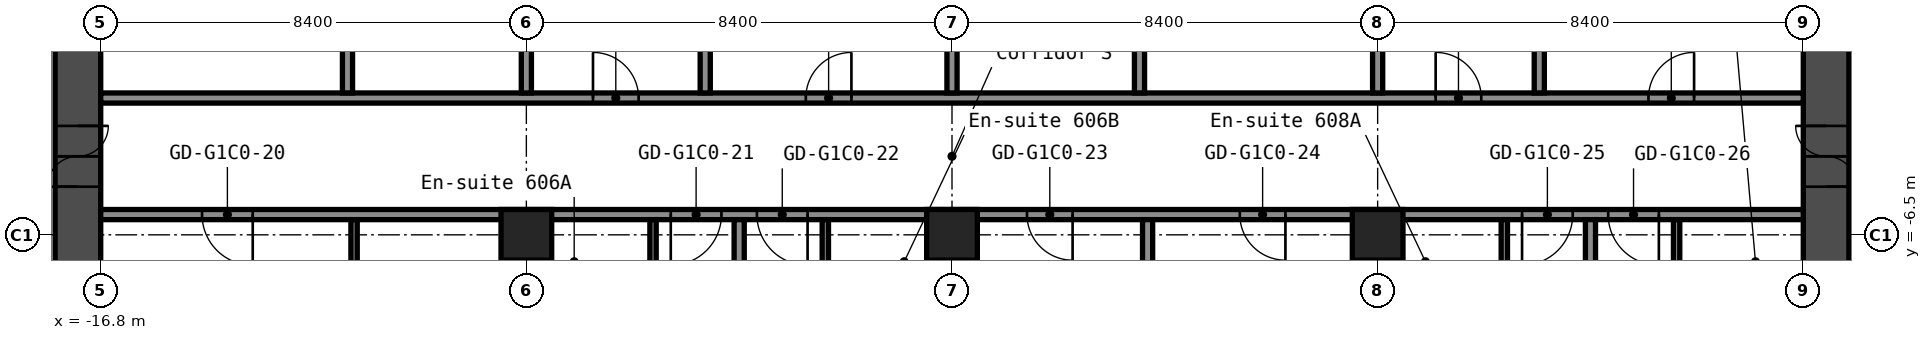
"""IFC4 building model, lengths in metres.
Left out: names, types, materials, properties, quantities, classifications, styles, units other than length and angle.
Written with IfcOpenShell. Run it as: python <this file> out.ifc"""

import sys

from ifc_helpers import new_model, si_unit, direction, frame, frame_2d, origin, origin_2d, place, context, subcontext, project, spatial, rectangle, hollow_rectangle, extrude, element, fill, save


model = new_model("IFC4")
c1 = context("Model", 3, precision=1e-05, world=origin(), true_north=direction((0.0, 1.0)))
c2 = subcontext(c1, "Body", "Model", "MODEL_VIEW")
j1 = project(units=[si_unit("LENGTHUNIT", "METRE"), si_unit("PLANEANGLEUNIT", "RADIAN")], contexts=[c1])
p1 = place(None, origin())
s1 = spatial("IfcSite", under=j1, at=p1, CompositionType="ELEMENT")
p2 = place(p1, origin())
s2 = spatial("IfcBuilding", under=s1, at=p2, CompositionType="ELEMENT")
p3 = place(p2, frame((0.0, 0.0, 26.2)))
s3 = spatial("IfcBuildingStorey", under=s2, at=p3, CompositionType="ELEMENT", Elevation=26.2)
for number, where, z_axis, x_axis in (
    (1, (-8.4, -6.5, 0.0), (0.0, 0.0, 1.0), (1.0, 0.0, 0.0)),
    (2, (0.0, -6.5, 0.0), (0.0, 0.0, 1.0), (1.0, 0.0, 0.0)),
    (3, (8.4, -6.5, 0.0), (0.0, 0.0, 1.0), (1.0, 0.0, 0.0)),
):
    element("IfcColumn", number, at=place(p3, frame(where, z_axis=z_axis, x_axis=x_axis)), inside=s3, PredefinedType="COLUMN", context=c2, shape_type="SweptSolid", body=[
        extrude(hollow_rectangle(XDim=1.0, YDim=1.0, WallThickness=0.04, at=origin_2d()), origin(), (0.0, 0.0, 1.0), 2.8),
    ])
p4 = place(p3, frame((-17.25, -8.4, 0.0), z_axis=(0.0, 0.0, 1.0), x_axis=(0.0, 1.0, 0.0)))
e4 = element("IfcWall", 4, at=p4, inside=s3, PredefinedType="SHEAR", context=c2, shape_type="SweptSolid", body=[
    extrude(rectangle(XDim=16.8, YDim=0.9, at=frame_2d((8.4, 0.0))), origin(), (0.0, 0.0, 1.0), 2.8),
])
p5 = place(p4, frame((12.75, 0.0, 0.0)))
e5 = element("IfcOpeningElement", 5, at=p5, cuts=e4, PredefinedType="OPENING", context=c2, shape_type="SweptSolid", body=[
    extrude(rectangle(XDim=1.2, YDim=2.1, at=frame_2d((0.6, 1.05))), frame((0.0, 0.46, 0.0), z_axis=(0.0, -1.0, 0.0), x_axis=(1.0, 0.0, 0.0)), (0.0, 0.0, 1.0), 0.92),
])
p6 = place(p4, frame((2.85, 0.0, 0.0)))
e6 = element("IfcOpeningElement", 6, at=p6, cuts=e4, PredefinedType="OPENING", context=c2, shape_type="SweptSolid", body=[
    extrude(rectangle(XDim=1.2, YDim=2.1, at=frame_2d((0.6, 1.05))), frame((0.0, 0.46, 0.0), z_axis=(0.0, -1.0, 0.0), x_axis=(1.0, 0.0, 0.0)), (0.0, 0.0, 1.0), 0.92),
])
p7 = place(p3, frame((17.25, -8.4, 0.0), z_axis=(0.0, 0.0, 1.0), x_axis=(0.0, 1.0, 0.0)))
e7 = element("IfcWall", 7, at=p7, inside=s3, PredefinedType="SHEAR", context=c2, shape_type="SweptSolid", body=[
    extrude(rectangle(XDim=16.8, YDim=0.9, at=frame_2d((8.4, 0.0))), origin(), (0.0, 0.0, 1.0), 2.8),
])
p8 = place(p7, frame((12.75, 0.0, 0.0)))
e8 = element("IfcOpeningElement", 8, at=p8, cuts=e7, PredefinedType="OPENING", context=c2, shape_type="SweptSolid", body=[
    extrude(rectangle(XDim=1.2, YDim=2.1, at=frame_2d((0.6, 1.05))), frame((0.0, 0.46, 0.0), z_axis=(0.0, -1.0, 0.0), x_axis=(1.0, 0.0, 0.0)), (0.0, 0.0, 1.0), 0.92),
])
p9 = place(p7, frame((2.85, 0.0, 0.0)))
e9 = element("IfcOpeningElement", 9, at=p9, cuts=e7, PredefinedType="OPENING", context=c2, shape_type="SweptSolid", body=[
    extrude(rectangle(XDim=1.2, YDim=2.1, at=frame_2d((0.6, 1.05))), frame((0.0, 0.46, 0.0), z_axis=(0.0, -1.0, 0.0), x_axis=(1.0, 0.0, 0.0)), (0.0, 0.0, 1.0), 0.92),
])
p10 = place(p3, frame((-16.8, -6.1, 0.0), z_axis=(0.0, 0.0, 1.0), x_axis=(1.0, 0.0, 0.0)))
e10 = element("IfcWall", 10, at=p10, inside=s3, PredefinedType="PARTITIONING", context=c2, shape_type="SweptSolid", body=[
    extrude(rectangle(XDim=33.6, YDim=0.2, at=frame_2d((16.8, 0.0))), origin(), (0.0, 0.0, 1.0), 2.8),
])
p11 = place(p10, frame((2.0, 0.0, 0.0)))
e11 = element("IfcOpeningElement", 11, at=p11, cuts=e10, PredefinedType="OPENING", context=c2, shape_type="SweptSolid", body=[
    extrude(rectangle(XDim=1.0, YDim=2.1, at=frame_2d((0.5, 1.05))), frame((0.0, 0.11, 0.0), z_axis=(0.0, -1.0, 0.0), x_axis=(1.0, 0.0, 0.0)), (0.0, 0.0, 1.0), 0.22),
])
p12 = place(p10, frame((11.25, 0.0, 0.0)))
e12 = element("IfcOpeningElement", 12, at=p12, cuts=e10, PredefinedType="OPENING", context=c2, shape_type="SweptSolid", body=[
    extrude(rectangle(XDim=1.0, YDim=2.1, at=frame_2d((0.5, 1.05))), frame((0.0, 0.11, 0.0), z_axis=(0.0, -1.0, 0.0), x_axis=(1.0, 0.0, 0.0)), (0.0, 0.0, 1.0), 0.22),
])
p13 = place(p10, frame((12.95, 0.0, 0.0)))
e13 = element("IfcOpeningElement", 13, at=p13, cuts=e10, PredefinedType="OPENING", context=c2, shape_type="SweptSolid", body=[
    extrude(rectangle(XDim=1.0, YDim=2.1, at=frame_2d((0.5, 1.05))), frame((0.0, 0.11, 0.0), z_axis=(0.0, -1.0, 0.0), x_axis=(1.0, 0.0, 0.0)), (0.0, 0.0, 1.0), 0.22),
])
p14 = place(p10, frame((18.28, 0.0, 0.0)))
e14 = element("IfcOpeningElement", 14, at=p14, cuts=e10, PredefinedType="OPENING", context=c2, shape_type="SweptSolid", body=[
    extrude(rectangle(XDim=0.9, YDim=2.1, at=frame_2d((0.45, 1.05))), frame((0.0, 0.11, 0.0), z_axis=(0.0, -1.0, 0.0), x_axis=(1.0, 0.0, 0.0)), (0.0, 0.0, 1.0), 0.22),
])
p15 = place(p10, frame((22.48, 0.0, 0.0)))
e15 = element("IfcOpeningElement", 15, at=p15, cuts=e10, PredefinedType="OPENING", context=c2, shape_type="SweptSolid", body=[
    extrude(rectangle(XDim=0.9, YDim=2.1, at=frame_2d((0.45, 1.05))), frame((0.0, 0.11, 0.0), z_axis=(0.0, -1.0, 0.0), x_axis=(1.0, 0.0, 0.0)), (0.0, 0.0, 1.0), 0.22),
])
p16 = place(p10, frame((28.05, 0.0, 0.0)))
e16 = element("IfcOpeningElement", 16, at=p16, cuts=e10, PredefinedType="OPENING", context=c2, shape_type="SweptSolid", body=[
    extrude(rectangle(XDim=1.0, YDim=2.1, at=frame_2d((0.5, 1.05))), frame((0.0, 0.11, 0.0), z_axis=(0.0, -1.0, 0.0), x_axis=(1.0, 0.0, 0.0)), (0.0, 0.0, 1.0), 0.22),
])
p17 = place(p10, frame((29.75, 0.0, 0.0)))
e17 = element("IfcOpeningElement", 17, at=p17, cuts=e10, PredefinedType="OPENING", context=c2, shape_type="SweptSolid", body=[
    extrude(rectangle(XDim=1.0, YDim=2.1, at=frame_2d((0.5, 1.05))), frame((0.0, 0.11, 0.0), z_axis=(0.0, -1.0, 0.0), x_axis=(1.0, 0.0, 0.0)), (0.0, 0.0, 1.0), 0.22),
])
p18 = place(p3, frame((-16.8, -3.8, 0.0), z_axis=(0.0, 0.0, 1.0), x_axis=(1.0, 0.0, 0.0)))
e18 = element("IfcWall", 18, at=p18, inside=s3, PredefinedType="PARTITIONING", context=c2, shape_type="SweptSolid", body=[
    extrude(rectangle(XDim=33.6, YDim=0.2, at=frame_2d((16.8, 0.0))), origin(), (0.0, 0.0, 1.0), 2.8),
])
p19 = place(p18, frame((9.715, 0.0, 0.0)))
e19 = element("IfcOpeningElement", 19, at=p19, cuts=e18, PredefinedType="OPENING", context=c2, shape_type="SweptSolid", body=[
    extrude(rectangle(XDim=0.9, YDim=2.1, at=frame_2d((0.45, 1.05))), frame((0.0, 0.11, 0.0), z_axis=(0.0, -1.0, 0.0), x_axis=(1.0, 0.0, 0.0)), (0.0, 0.0, 1.0), 0.22),
])
p20 = place(p18, frame((13.915, 0.0, 0.0)))
e20 = element("IfcOpeningElement", 20, at=p20, cuts=e18, PredefinedType="OPENING", context=c2, shape_type="SweptSolid", body=[
    extrude(rectangle(XDim=0.9, YDim=2.1, at=frame_2d((0.45, 1.05))), frame((0.0, 0.11, 0.0), z_axis=(0.0, -1.0, 0.0), x_axis=(1.0, 0.0, 0.0)), (0.0, 0.0, 1.0), 0.22),
])
p21 = place(p18, frame((26.345, 0.0, 0.0)))
e21 = element("IfcOpeningElement", 21, at=p21, cuts=e18, PredefinedType="OPENING", context=c2, shape_type="SweptSolid", body=[
    extrude(rectangle(XDim=0.9, YDim=2.1, at=frame_2d((0.45, 1.05))), frame((0.0, 0.11, 0.0), z_axis=(0.0, -1.0, 0.0), x_axis=(1.0, 0.0, 0.0)), (0.0, 0.0, 1.0), 0.22),
])
p22 = place(p18, frame((30.545, 0.0, 0.0)))
e22 = element("IfcOpeningElement", 22, at=p22, cuts=e18, PredefinedType="OPENING", context=c2, shape_type="SweptSolid", body=[
    extrude(rectangle(XDim=0.9, YDim=2.1, at=frame_2d((0.45, 1.05))), frame((0.0, 0.11, 0.0), z_axis=(0.0, -1.0, 0.0), x_axis=(1.0, 0.0, 0.0)), (0.0, 0.0, 1.0), 0.22),
])
p23 = place(p3, frame((-11.93, -3.7, 0.0), z_axis=(0.0, 0.0, 1.0), x_axis=(0.0, 1.0, 0.0)))
e23 = element("IfcWall", 23, at=p23, inside=s3, PredefinedType="PARTITIONING", context=c2, shape_type="SweptSolid", body=[
    extrude(rectangle(XDim=7.4, YDim=0.2, at=frame_2d((3.7, 0.0))), origin(), (0.0, 0.0, 1.0), 2.8),
])
p24 = place(p3, frame((-11.8, -9.5, 0.0), z_axis=(0.0, 0.0, 1.0), x_axis=(0.0, 1.0, 0.0)))
e24 = element("IfcWall", 24, at=p24, inside=s3, PredefinedType="PARTITIONING", context=c2, shape_type="SweptSolid", body=[
    extrude(rectangle(XDim=3.3, YDim=0.125, at=frame_2d((1.65, 0.0))), origin(), (0.0, 0.0, 1.0), 2.8),
])
p25 = place(p3, frame((-8.4, -20.3, 0.0), z_axis=(0.0, 0.0, 1.0), x_axis=(0.0, 1.0, 0.0)))
e25 = element("IfcWall", 25, at=p25, inside=s3, PredefinedType="PARTITIONING", context=c2, shape_type="SweptSolid", body=[
    extrude(rectangle(XDim=13.31, YDim=0.2, at=frame_2d((6.655, 0.0))), origin(), (0.0, 0.0, 1.0), 2.8),
])
p26 = place(p3, frame((-8.4, -3.7, 0.0), z_axis=(0.0, 0.0, 1.0), x_axis=(0.0, 1.0, 0.0)))
e26 = element("IfcWall", 26, at=p26, inside=s3, PredefinedType="PARTITIONING", context=c2, shape_type="SweptSolid", body=[
    extrude(rectangle(XDim=7.4, YDim=0.2, at=frame_2d((3.7, 0.0))), origin(), (0.0, 0.0, 1.0), 2.8),
])
p27 = place(p3, frame((-5.9, -9.1, 0.0), z_axis=(0.0, 0.0, 1.0), x_axis=(0.0, 1.0, 0.0)))
e27 = element("IfcWall", 27, at=p27, inside=s3, PredefinedType="PARTITIONING", context=c2, shape_type="SweptSolid", body=[
    extrude(rectangle(XDim=2.9, YDim=0.125, at=frame_2d((1.45, 0.0))), origin(), (0.0, 0.0, 1.0), 2.8),
])
p28 = place(p27, frame((0.6, 0.0, 0.0)))
e28 = element("IfcOpeningElement", 28, at=p28, cuts=e27, PredefinedType="OPENING", context=c2, shape_type="SweptSolid", body=[
    extrude(rectangle(XDim=0.8, YDim=2.1, at=frame_2d((0.4, 1.05))), frame((0.0, 0.073, 0.0), z_axis=(0.0, -1.0, 0.0), x_axis=(1.0, 0.0, 0.0)), (0.0, 0.0, 1.0), 0.145),
])
p29 = place(p3, frame((-4.87, -3.7, 0.0), z_axis=(0.0, 0.0, 1.0), x_axis=(0.0, 1.0, 0.0)))
e29 = element("IfcWall", 29, at=p29, inside=s3, PredefinedType="PARTITIONING", context=c2, shape_type="SweptSolid", body=[
    extrude(rectangle(XDim=7.4, YDim=0.2, at=frame_2d((3.7, 0.0))), origin(), (0.0, 0.0, 1.0), 2.8),
])
p30 = place(p3, frame((-4.2, -20.3, 0.0), z_axis=(0.0, 0.0, 1.0), x_axis=(0.0, 1.0, 0.0)))
e30 = element("IfcWall", 30, at=p30, inside=s3, PredefinedType="PARTITIONING", context=c2, shape_type="SweptSolid", body=[
    extrude(rectangle(XDim=14.1, YDim=0.2, at=frame_2d((7.05, 0.0))), origin(), (0.0, 0.0, 1.0), 2.8),
])
p31 = place(p3, frame((-2.5, -9.1, 0.0), z_axis=(0.0, 0.0, 1.0), x_axis=(0.0, 1.0, 0.0)))
e31 = element("IfcWall", 31, at=p31, inside=s3, PredefinedType="PARTITIONING", context=c2, shape_type="SweptSolid", body=[
    extrude(rectangle(XDim=2.9, YDim=0.125, at=frame_2d((1.45, 0.0))), origin(), (0.0, 0.0, 1.0), 2.8),
])
p32 = place(p31, frame((0.6, 0.0, 0.0)))
e32 = element("IfcOpeningElement", 32, at=p32, cuts=e31, PredefinedType="OPENING", context=c2, shape_type="SweptSolid", body=[
    extrude(rectangle(XDim=0.8, YDim=2.1, at=frame_2d((0.4, 1.05))), frame((0.0, 0.073, 0.0), z_axis=(0.0, -1.0, 0.0), x_axis=(1.0, 0.0, 0.0)), (0.0, 0.0, 1.0), 0.145),
])
p33 = place(p3, frame((0.0, -20.3, 0.0), z_axis=(0.0, 0.0, 1.0), x_axis=(0.0, 1.0, 0.0)))
e33 = element("IfcWall", 33, at=p33, inside=s3, PredefinedType="PARTITIONING", context=c2, shape_type="SweptSolid", body=[
    extrude(rectangle(XDim=13.31, YDim=0.2, at=frame_2d((6.655, 0.0))), origin(), (0.0, 0.0, 1.0), 2.8),
])
for number, where, z_axis, x_axis in (
    (34, (0.0, -3.7, 0.0), (0.0, 0.0, 1.0), (0.0, 1.0, 0.0)),
    (35, (3.7, -3.7, 0.0), (0.0, 0.0, 1.0), (0.0, 1.0, 0.0)),
):
    element("IfcWall", number, at=place(p3, frame(where, z_axis=z_axis, x_axis=x_axis)), inside=s3, PredefinedType="PARTITIONING", context=c2, shape_type="SweptSolid", body=[
        extrude(rectangle(XDim=7.4, YDim=0.2, at=frame_2d((3.7, 0.0))), origin(), (0.0, 0.0, 1.0), 2.8),
    ])
p34 = place(p3, frame((3.86, -20.3, 0.0), z_axis=(0.0, 0.0, 1.0), x_axis=(0.0, 1.0, 0.0)))
e36 = element("IfcWall", 36, at=p34, inside=s3, PredefinedType="PARTITIONING", context=c2, shape_type="SweptSolid", body=[
    extrude(rectangle(XDim=14.1, YDim=0.2, at=frame_2d((7.05, 0.0))), origin(), (0.0, 0.0, 1.0), 2.8),
])
p35 = place(p3, frame((8.4, -20.3, 0.0), z_axis=(0.0, 0.0, 1.0), x_axis=(0.0, 1.0, 0.0)))
e37 = element("IfcWall", 37, at=p35, inside=s3, PredefinedType="PARTITIONING", context=c2, shape_type="SweptSolid", body=[
    extrude(rectangle(XDim=13.31, YDim=0.2, at=frame_2d((6.655, 0.0))), origin(), (0.0, 0.0, 1.0), 2.8),
])
p36 = place(p3, frame((8.4, -3.7, 0.0), z_axis=(0.0, 0.0, 1.0), x_axis=(0.0, 1.0, 0.0)))
e38 = element("IfcWall", 38, at=p36, inside=s3, PredefinedType="PARTITIONING", context=c2, shape_type="SweptSolid", body=[
    extrude(rectangle(XDim=7.4, YDim=0.2, at=frame_2d((3.7, 0.0))), origin(), (0.0, 0.0, 1.0), 2.8),
])
p37 = place(p3, frame((10.9, -9.1, 0.0), z_axis=(0.0, 0.0, 1.0), x_axis=(0.0, 1.0, 0.0)))
e39 = element("IfcWall", 39, at=p37, inside=s3, PredefinedType="PARTITIONING", context=c2, shape_type="SweptSolid", body=[
    extrude(rectangle(XDim=2.9, YDim=0.125, at=frame_2d((1.45, 0.0))), origin(), (0.0, 0.0, 1.0), 2.8),
])
p38 = place(p37, frame((0.6, 0.0, 0.0)))
e40 = element("IfcOpeningElement", 40, at=p38, cuts=e39, PredefinedType="OPENING", context=c2, shape_type="SweptSolid", body=[
    extrude(rectangle(XDim=0.8, YDim=2.1, at=frame_2d((0.4, 1.05))), frame((0.0, 0.073, 0.0), z_axis=(0.0, -1.0, 0.0), x_axis=(1.0, 0.0, 0.0)), (0.0, 0.0, 1.0), 0.145),
])
p39 = place(p3, frame((11.59, -3.7, 0.0), z_axis=(0.0, 0.0, 1.0), x_axis=(0.0, 1.0, 0.0)))
e41 = element("IfcWall", 41, at=p39, inside=s3, PredefinedType="PARTITIONING", context=c2, shape_type="SweptSolid", body=[
    extrude(rectangle(XDim=7.4, YDim=0.2, at=frame_2d((3.7, 0.0))), origin(), (0.0, 0.0, 1.0), 2.8),
])
p40 = place(p3, frame((12.6, -20.3, 0.0), z_axis=(0.0, 0.0, 1.0), x_axis=(0.0, 1.0, 0.0)))
e42 = element("IfcWall", 42, at=p40, inside=s3, PredefinedType="PARTITIONING", context=c2, shape_type="SweptSolid", body=[
    extrude(rectangle(XDim=14.1, YDim=0.2, at=frame_2d((7.05, 0.0))), origin(), (0.0, 0.0, 1.0), 2.8),
])
p41 = place(p3, frame((14.3, -9.1, 0.0), z_axis=(0.0, 0.0, 1.0), x_axis=(0.0, 1.0, 0.0)))
e43 = element("IfcWall", 43, at=p41, inside=s3, PredefinedType="PARTITIONING", context=c2, shape_type="SweptSolid", body=[
    extrude(rectangle(XDim=2.9, YDim=0.125, at=frame_2d((1.45, 0.0))), origin(), (0.0, 0.0, 1.0), 2.8),
])
p42 = place(p41, frame((0.6, 0.0, 0.0)))
e44 = element("IfcOpeningElement", 44, at=p42, cuts=e43, PredefinedType="OPENING", context=c2, shape_type="SweptSolid", body=[
    extrude(rectangle(XDim=0.8, YDim=2.1, at=frame_2d((0.4, 1.05))), frame((0.0, 0.073, 0.0), z_axis=(0.0, -1.0, 0.0), x_axis=(1.0, 0.0, 0.0)), (0.0, 0.0, 1.0), 0.145),
])
p43 = place(p6, origin())
e45 = element("IfcDoor", 45, at=p43, inside=s3, OperationType="DOUBLE_DOOR_SINGLE_SWING", PredefinedType="DOOR", context=c2, shape_type="SweptSolid", body=[
    extrude(rectangle(XDim=1.2, YDim=2.1, at=frame_2d((0.6, 1.05))), frame((0.0, 0.025, 0.0), z_axis=(0.0, -1.0, 0.0), x_axis=(1.0, 0.0, 0.0)), (0.0, 0.0, 1.0), 0.05),
])
fill(e6, e45)
p44 = place(p9, origin())
e46 = element("IfcDoor", 46, at=p44, inside=s3, OperationType="DOUBLE_DOOR_SINGLE_SWING", PredefinedType="DOOR", context=c2, shape_type="SweptSolid", body=[
    extrude(rectangle(XDim=1.2, YDim=2.1, at=frame_2d((0.6, 1.05))), frame((0.0, 0.025, 0.0), z_axis=(0.0, -1.0, 0.0), x_axis=(1.0, 0.0, 0.0)), (0.0, 0.0, 1.0), 0.05),
])
fill(e9, e46)
p45 = place(p11, origin())
e47 = element("IfcDoor", 47, at=p45, inside=s3, OperationType="SINGLE_SWING_RIGHT", PredefinedType="DOOR", context=c2, shape_type="SweptSolid", body=[
    extrude(rectangle(XDim=1.0, YDim=2.1, at=frame_2d((0.5, 1.05))), frame((0.0, 0.025, 0.0), z_axis=(0.0, -1.0, 0.0), x_axis=(1.0, 0.0, 0.0)), (0.0, 0.0, 1.0), 0.05),
])
fill(e11, e47)
p46 = place(p12, origin())
e48 = element("IfcDoor", 48, at=p46, inside=s3, OperationType="SINGLE_SWING_LEFT", PredefinedType="DOOR", context=c2, shape_type="SweptSolid", body=[
    extrude(rectangle(XDim=1.0, YDim=2.1, at=frame_2d((0.5, 1.05))), frame((0.0, 0.025, 0.0), z_axis=(0.0, -1.0, 0.0), x_axis=(1.0, 0.0, 0.0)), (0.0, 0.0, 1.0), 0.05),
])
fill(e12, e48)
p47 = place(p13, origin())
e49 = element("IfcDoor", 49, at=p47, inside=s3, OperationType="SINGLE_SWING_RIGHT", PredefinedType="DOOR", context=c2, shape_type="SweptSolid", body=[
    extrude(rectangle(XDim=1.0, YDim=2.1, at=frame_2d((0.5, 1.05))), frame((0.0, 0.025, 0.0), z_axis=(0.0, -1.0, 0.0), x_axis=(1.0, 0.0, 0.0)), (0.0, 0.0, 1.0), 0.05),
])
fill(e13, e49)
p48 = place(p14, origin())
e50 = element("IfcDoor", 50, at=p48, inside=s3, OperationType="SINGLE_SWING_RIGHT", PredefinedType="DOOR", context=c2, shape_type="SweptSolid", body=[
    extrude(rectangle(XDim=0.9, YDim=2.1, at=frame_2d((0.45, 1.05))), frame((0.0, 0.025, 0.0), z_axis=(0.0, -1.0, 0.0), x_axis=(1.0, 0.0, 0.0)), (0.0, 0.0, 1.0), 0.05),
])
fill(e14, e50)
p49 = place(p15, origin())
e51 = element("IfcDoor", 51, at=p49, inside=s3, OperationType="SINGLE_SWING_RIGHT", PredefinedType="DOOR", context=c2, shape_type="SweptSolid", body=[
    extrude(rectangle(XDim=0.9, YDim=2.1, at=frame_2d((0.45, 1.05))), frame((0.0, 0.025, 0.0), z_axis=(0.0, -1.0, 0.0), x_axis=(1.0, 0.0, 0.0)), (0.0, 0.0, 1.0), 0.05),
])
fill(e15, e51)
p50 = place(p16, origin())
e52 = element("IfcDoor", 52, at=p50, inside=s3, OperationType="SINGLE_SWING_LEFT", PredefinedType="DOOR", context=c2, shape_type="SweptSolid", body=[
    extrude(rectangle(XDim=1.0, YDim=2.1, at=frame_2d((0.5, 1.05))), frame((0.0, 0.025, 0.0), z_axis=(0.0, -1.0, 0.0), x_axis=(1.0, 0.0, 0.0)), (0.0, 0.0, 1.0), 0.05),
])
fill(e16, e52)
p51 = place(p17, origin())
e53 = element("IfcDoor", 53, at=p51, inside=s3, OperationType="SINGLE_SWING_RIGHT", PredefinedType="DOOR", context=c2, shape_type="SweptSolid", body=[
    extrude(rectangle(XDim=1.0, YDim=2.1, at=frame_2d((0.5, 1.05))), frame((0.0, 0.025, 0.0), z_axis=(0.0, -1.0, 0.0), x_axis=(1.0, 0.0, 0.0)), (0.0, 0.0, 1.0), 0.05),
])
fill(e17, e53)
p52 = place(p19, origin())
e54 = element("IfcDoor", 54, at=p52, inside=s3, OperationType="SINGLE_SWING_RIGHT", PredefinedType="DOOR", context=c2, shape_type="SweptSolid", body=[
    extrude(rectangle(XDim=0.9, YDim=2.1, at=frame_2d((0.45, 1.05))), frame((0.0, 0.025, 0.0), z_axis=(0.0, -1.0, 0.0), x_axis=(1.0, 0.0, 0.0)), (0.0, 0.0, 1.0), 0.05),
])
fill(e19, e54)
p53 = place(p20, origin())
e55 = element("IfcDoor", 55, at=p53, inside=s3, OperationType="SINGLE_SWING_LEFT", PredefinedType="DOOR", context=c2, shape_type="SweptSolid", body=[
    extrude(rectangle(XDim=0.9, YDim=2.1, at=frame_2d((0.45, 1.05))), frame((0.0, 0.025, 0.0), z_axis=(0.0, -1.0, 0.0), x_axis=(1.0, 0.0, 0.0)), (0.0, 0.0, 1.0), 0.05),
])
fill(e20, e55)
p54 = place(p21, origin())
e56 = element("IfcDoor", 56, at=p54, inside=s3, OperationType="SINGLE_SWING_RIGHT", PredefinedType="DOOR", context=c2, shape_type="SweptSolid", body=[
    extrude(rectangle(XDim=0.9, YDim=2.1, at=frame_2d((0.45, 1.05))), frame((0.0, 0.025, 0.0), z_axis=(0.0, -1.0, 0.0), x_axis=(1.0, 0.0, 0.0)), (0.0, 0.0, 1.0), 0.05),
])
fill(e21, e56)
p55 = place(p22, origin())
e57 = element("IfcDoor", 57, at=p55, inside=s3, OperationType="SINGLE_SWING_LEFT", PredefinedType="DOOR", context=c2, shape_type="SweptSolid", body=[
    extrude(rectangle(XDim=0.9, YDim=2.1, at=frame_2d((0.45, 1.05))), frame((0.0, 0.025, 0.0), z_axis=(0.0, -1.0, 0.0), x_axis=(1.0, 0.0, 0.0)), (0.0, 0.0, 1.0), 0.05),
])
fill(e22, e57)
save(model, sys.argv[1])
